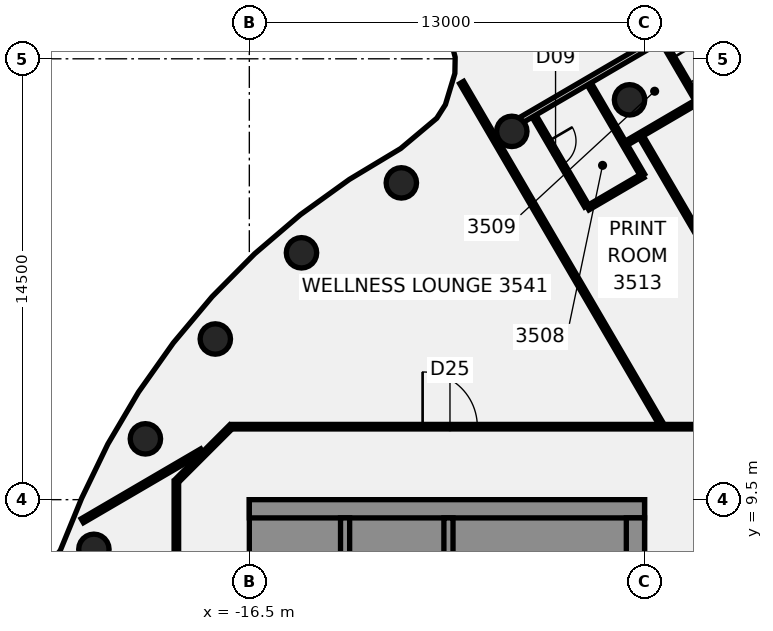
"""IFC4 building model, lengths in metres.
Left out: names, types, materials, properties, quantities, classifications, styles, units other than length and angle.
Written with IfcOpenShell. Run it as: python <this file> out.ifc"""

import sys

from ifc_helpers import new_model, si_unit, direction, frame, frame_2d, origin, origin_2d, place, context, subcontext, project, spatial, polyline, rectangle, circle, outline, extrude, element, fill, save


model = new_model("IFC4")
c1 = context("Model", 3, precision=1e-05, world=origin(), true_north=direction((0.0, 1.0)))
c2 = subcontext(c1, "Body", "Model", "MODEL_VIEW")
j1 = project(units=[si_unit("LENGTHUNIT", "METRE"), si_unit("PLANEANGLEUNIT", "RADIAN")], contexts=[c1])
p1 = place(None, origin())
s1 = spatial("IfcSite", under=j1, at=p1, CompositionType="ELEMENT")
p2 = place(p1, origin())
s2 = spatial("IfcBuilding", under=s1, at=p2, CompositionType="ELEMENT")
p3 = place(p2, frame((0.0, 0.0, 144.25)))
s3 = spatial("IfcBuildingStorey", under=s2, at=p3, CompositionType="ELEMENT", Elevation=144.25)
for number, where, z_axis, x_axis in (
    (1, (-3.994, 22.651, -0.14), (0.0, 0.0, 1.0), (1.0, 0.0, 0.0)),
    (2, (-7.866, 21.613, -0.14), (0.0, 0.0, 1.0), (1.0, 0.0, 0.0)),
    (3, (-11.5, 19.919, -0.14), (0.0, 0.0, 1.0), (1.0, 0.0, 0.0)),
    (4, (-14.784, 17.619, -0.14), (0.0, 0.0, 1.0), (1.0, 0.0, 0.0)),
    (5, (-17.619, 14.784, -0.14), (0.0, 0.0, 1.0), (1.0, 0.0, 0.0)),
    (6, (-19.919, 11.5, -0.14), (0.0, 0.0, 1.0), (1.0, 0.0, 0.0)),
    (7, (-21.613, 7.866, -0.14), (0.0, 0.0, 1.0), (1.0, 0.0, 0.0)),
):
    element("IfcColumn", number, at=place(p3, frame(where, z_axis=z_axis, x_axis=x_axis)), inside=s3, PredefinedType="COLUMN", context=c2, shape_type="SweptSolid", body=[
        extrude(circle(Radius=0.5, at=origin_2d()), origin(), (0.0, 0.0, 1.0), 3.75),
    ])
p4 = place(p3, frame((-11.997, 40.152, 0.0), z_axis=(0.0, 0.0, 1.0), x_axis=(0.504565342265, -0.863373508619, 0.0)))
e8 = element("IfcWall", 8, at=p4, inside=s3, PredefinedType="PARTITIONING", context=c2, shape_type="SweptSolid", body=[
    extrude(rectangle(XDim=20.306, YDim=0.15, at=frame_2d((10.153, 0.0))), origin(), (0.0, 0.0, 1.0), 3.01),
])
p5 = place(p4, frame((18.675, 0.0, 0.0)))
e9 = element("IfcOpeningElement", 9, at=p5, cuts=e8, PredefinedType="OPENING", context=c2, shape_type="SweptSolid", body=[
    extrude(rectangle(XDim=1.0, YDim=2.1, at=frame_2d((0.5, 1.05))), frame((0.0, 0.085, 0.0), z_axis=(0.0, -1.0, 0.0), x_axis=(1.0, 0.0, 0.0)), (0.0, 0.0, 1.0), 0.17),
])
p6 = place(p4, frame((8.776, 0.0, 0.0)))
e10 = element("IfcOpeningElement", 10, at=p6, cuts=e8, PredefinedType="OPENING", context=c2, shape_type="SweptSolid", body=[
    extrude(rectangle(XDim=0.9, YDim=2.1, at=frame_2d((0.45, 1.05))), frame((0.0, 0.085, 0.0), z_axis=(0.0, -1.0, 0.0), x_axis=(1.0, 0.0, 0.0)), (0.0, 0.0, 1.0), 0.17),
])
p7 = place(p4, frame((2.325, 0.0, 0.0)))
e11 = element("IfcOpeningElement", 11, at=p7, cuts=e8, PredefinedType="OPENING", context=c2, shape_type="SweptSolid", body=[
    extrude(rectangle(XDim=0.9, YDim=2.1, at=frame_2d((0.45, 1.05))), frame((0.0, 0.085, 0.0), z_axis=(0.0, -1.0, 0.0), x_axis=(1.0, 0.0, 0.0)), (0.0, 0.0, 1.0), 0.17),
])
p8 = place(p3, frame((-9.516, 23.22, 0.0), z_axis=(0.0, 0.0, 1.0), x_axis=(0.504508390898, -0.863406789128, 0.0)))
e12 = element("IfcWall", 12, at=p8, inside=s3, PredefinedType="PARTITIONING", context=c2, shape_type="SweptSolid", body=[
    extrude(rectangle(XDim=13.001, YDim=0.15, at=frame_2d((6.5, 0.0))), origin(), (0.0, 0.0, 1.0), 3.01),
])
p9 = place(p3, frame((-7.134, 22.117, 0.0), z_axis=(0.0, 0.0, 1.0), x_axis=(0.504522469431, -0.863398562565, 0.0)))
e13 = element("IfcWall", 13, at=p9, inside=s3, PredefinedType="PARTITIONING", context=c2, shape_type="SweptSolid", body=[
    extrude(rectangle(XDim=3.425, YDim=0.15, at=frame_2d((1.712, 0.0))), origin(), (0.0, 0.0, 1.0), 3.01),
])
p10 = place(p9, frame((0.95, 0.0, 0.0)))
e14 = element("IfcOpeningElement", 14, at=p10, cuts=e13, PredefinedType="OPENING", context=c2, shape_type="SweptSolid", body=[
    extrude(rectangle(XDim=0.9, YDim=2.1, at=frame_2d((0.45, 1.05))), frame((0.0, 0.085, 0.0), z_axis=(0.0, -1.0, 0.0), x_axis=(1.0, 0.0, 0.0)), (0.0, 0.0, 1.0), 0.17),
])
p11 = place(p3, frame((-5.318, 23.172, 0.0), z_axis=(0.0, 0.0, 1.0), x_axis=(0.504499996909, -0.863411693874, 0.0)))
e15 = element("IfcWall", 15, at=p11, inside=s3, PredefinedType="PARTITIONING", context=c2, shape_type="SweptSolid", body=[
    extrude(rectangle(XDim=3.475, YDim=0.15, at=frame_2d((1.737, 0.0))), origin(), (0.0, 0.0, 1.0), 3.01),
])
p12 = place(p3, frame((-3.604, 21.429, 0.0), z_axis=(0.0, 0.0, 1.0), x_axis=(0.504518269276, -0.86340101689, 0.0)))
e16 = element("IfcWall", 16, at=p12, inside=s3, PredefinedType="PARTITIONING", context=c2, shape_type="SweptSolid", body=[
    extrude(rectangle(XDim=10.927, YDim=0.15, at=frame_2d((5.463, 0.0))), origin(), (0.0, 0.0, 1.0), 3.01),
])
p13 = place(p12, frame((6.525, 0.0, 0.0)))
e17 = element("IfcOpeningElement", 17, at=p13, cuts=e16, PredefinedType="OPENING", context=c2, shape_type="SweptSolid", body=[
    extrude(rectangle(XDim=0.9, YDim=2.1, at=frame_2d((0.45, 1.05))), frame((0.0, 0.085, 0.0), z_axis=(0.0, -1.0, 0.0), x_axis=(1.0, 0.0, 0.0)), (0.0, 0.0, 1.0), 0.17),
])
p14 = place(p3, frame((-17.065, 11.9, 0.0), z_axis=(0.0, 0.0, 1.0), x_axis=(1.0, 0.0, 0.0)))
e18 = element("IfcWall", 18, at=p14, inside=s3, PredefinedType="PARTITIONING", context=c2, shape_type="SweptSolid", body=[
    extrude(rectangle(XDim=34.165, YDim=0.15, at=frame_2d((17.083, 0.0))), origin(), (0.0, 0.0, 1.0), 3.01),
])
p15 = place(p14, frame((22.029, 0.0, 0.0)))
e19 = element("IfcOpeningElement", 19, at=p15, cuts=e18, PredefinedType="OPENING", context=c2, shape_type="SweptSolid", body=[
    extrude(rectangle(XDim=1.8, YDim=2.1, at=frame_2d((0.9, 1.05))), frame((0.0, 0.085, 0.0), z_axis=(0.0, -1.0, 0.0), x_axis=(1.0, 0.0, 0.0)), (0.0, 0.0, 1.0), 0.17),
])
p16 = place(p14, frame((29.48, 0.0, 0.0)))
e20 = element("IfcOpeningElement", 20, at=p16, cuts=e18, PredefinedType="OPENING", context=c2, shape_type="SweptSolid", body=[
    extrude(rectangle(XDim=1.8, YDim=2.1, at=frame_2d((0.9, 1.05))), frame((0.0, 0.085, 0.0), z_axis=(0.0, -1.0, 0.0), x_axis=(1.0, 0.0, 0.0)), (0.0, 0.0, 1.0), 0.17),
])
p17 = place(p14, frame((6.265, 0.0, 0.0)))
e21 = element("IfcOpeningElement", 21, at=p17, cuts=e18, PredefinedType="OPENING", context=c2, shape_type="SweptSolid", body=[
    extrude(rectangle(XDim=1.8, YDim=2.1, at=frame_2d((0.9, 1.05))), frame((0.0, 0.085, 0.0), z_axis=(0.0, -1.0, 0.0), x_axis=(1.0, 0.0, 0.0)), (0.0, 0.0, 1.0), 0.17),
])
p18 = place(p3, frame((-21.993, 8.807, 0.0), z_axis=(0.0, 0.0, 1.0), x_axis=(0.863415016257, 0.504494310871, 0.0)))
e22 = element("IfcWall", 22, at=p18, inside=s3, PredefinedType="PARTITIONING", context=c2, shape_type="SweptSolid", body=[
    extrude(rectangle(XDim=4.553, YDim=0.15, at=frame_2d((2.277, 0.0))), origin(), (0.0, 0.0, 1.0), 3.01),
])
p19 = place(p3, frame((-7.763, 21.865, 0.0), z_axis=(0.0, 0.0, 1.0), x_axis=(0.863607279879, 0.504165117933, 0.0)))
e23 = element("IfcWall", 23, at=p19, inside=s3, PredefinedType="PARTITIONING", context=c2, shape_type="SweptSolid", body=[
    extrude(rectangle(XDim=13.47, YDim=0.2, at=frame_2d((6.735, 0.0))), origin(), (0.0, 0.0, 1.0), 3.01),
])
p20 = place(p19, frame((5.872, 0.0, 0.0)))
e24 = element("IfcOpeningElement", 24, at=p20, cuts=e23, PredefinedType="OPENING", context=c2, shape_type="SweptSolid", body=[
    extrude(rectangle(XDim=1.4, YDim=2.1, at=frame_2d((0.7, 1.05))), frame((0.0, 0.11, 0.0), z_axis=(0.0, -1.0, 0.0), x_axis=(1.0, 0.0, 0.0)), (0.0, 0.0, 1.0), 0.22),
])
p21 = place(p3, frame((-5.368, 19.095, 0.0), z_axis=(0.0, 0.0, 1.0), x_axis=(0.863264064629, 0.504752567819, 0.0)))
e25 = element("IfcWall", 25, at=p21, inside=s3, PredefinedType="PARTITIONING", context=c2, shape_type="SweptSolid", body=[
    extrude(rectangle(XDim=2.1, YDim=0.15, at=frame_2d((1.05, 0.0))), origin(), (0.0, 0.0, 1.0), 3.01),
])
p22 = place(p3, frame((-4.095, 21.229, 0.0), z_axis=(0.0, 0.0, 1.0), x_axis=(0.863209703011, 0.504845529472, 0.0)))
e26 = element("IfcWall", 26, at=p22, inside=s3, PredefinedType="PARTITIONING", context=c2, shape_type="SweptSolid", body=[
    extrude(rectangle(XDim=2.725, YDim=0.15, at=frame_2d((1.363, 0.0))), origin(), (0.0, 0.0, 1.0), 3.01),
])
p23 = place(p3, frame((-18.872, 10.128, 0.0), z_axis=(0.0, 0.0, 1.0), x_axis=(0.707106781187, 0.707106781187, 0.0)))
e27 = element("IfcWall", 27, at=p23, inside=s3, PredefinedType="PARTITIONING", context=c2, shape_type="SweptSolid", body=[
    extrude(rectangle(XDim=2.505, YDim=0.15, at=frame_2d((1.253, 0.0))), origin(), (0.0, 0.0, 1.0), 3.01),
])
p24 = place(p3, frame((-18.9, -10.1, 0.0), z_axis=(0.0, 0.0, 1.0), x_axis=(0.0, 1.0, 0.0)))
e28 = element("IfcWall", 28, at=p24, inside=s3, PredefinedType="PARTITIONING", context=c2, shape_type="SweptSolid", body=[
    extrude(rectangle(XDim=20.2, YDim=0.15, at=frame_2d((10.1, 0.0))), origin(), (0.0, 0.0, 1.0), 3.01),
])
p25 = place(p24, frame((11.874, 0.0, 0.0)))
e29 = element("IfcOpeningElement", 29, at=p25, cuts=e28, PredefinedType="OPENING", context=c2, shape_type="SweptSolid", body=[
    extrude(rectangle(XDim=1.8, YDim=2.1, at=frame_2d((0.9, 1.05))), frame((0.0, 0.085, 0.0), z_axis=(0.0, -1.0, 0.0), x_axis=(1.0, 0.0, 0.0)), (0.0, 0.0, 1.0), 0.17),
])
p26 = place(p24, frame((4.159, 0.0, 0.0)))
e30 = element("IfcOpeningElement", 30, at=p26, cuts=e28, PredefinedType="OPENING", context=c2, shape_type="SweptSolid", body=[
    extrude(rectangle(XDim=1.8, YDim=2.1, at=frame_2d((0.9, 1.05))), frame((0.0, 0.085, 0.0), z_axis=(0.0, -1.0, 0.0), x_axis=(1.0, 0.0, 0.0)), (0.0, 0.0, 1.0), 0.17),
])
p27 = place(p3, origin())
e31 = element("IfcWall", 31, at=p27, inside=s3, PredefinedType="SHEAR", context=c2, shape_type="SweptSolid", body=[
    extrude(outline(polyline([(-13.5, -8.125), (-15.9, -8.125), (-15.9, -5.625), (-13.5, -5.625), (-13.5, -5.375), (-15.9, -5.375), (-15.9, 5.375), (-13.5, 5.375), (-13.5, 5.625), (-15.9, 5.625), (-15.9, 8.125), (-13.5, 8.125), (-13.5, 8.9), (-15.9, 8.9), (-16.5, 8.9), (-16.5, -8.9), (-15.9, -8.9), (-13.5, -8.9), (-13.5, -8.125)])), origin(), (0.0, 0.0, 1.0), 3.61),
])
p28 = place(p3, frame((-16.5, 9.2, 0.0), z_axis=(0.0, 0.0, 1.0), x_axis=(1.0, 0.0, 0.0)))
e32 = element("IfcWall", 32, at=p28, inside=s3, PredefinedType="SHEAR", context=c2, shape_type="SweptSolid", body=[
    extrude(rectangle(XDim=13.0, YDim=0.6, at=frame_2d((6.5, 0.0))), origin(), (0.0, 0.0, 1.0), 3.61),
])
p29 = place(p3, origin())
e33 = element("IfcWall", 33, at=p29, inside=s3, PredefinedType="SHEAR", context=c2, shape_type="SweptSolid", body=[
    extrude(outline(polyline([(-9.8, -5.375), (-9.8, -5.625), (-7.5, -5.625), (-7.2, -5.625), (-7.2, 8.9), (-7.5, 8.9), (-9.8, 8.9), (-9.8, 8.125), (-7.5, 8.125), (-7.5, 5.625), (-9.8, 5.625), (-9.8, 5.375), (-7.5, 5.375), (-7.5, 2.875), (-9.8, 2.875), (-9.8, 2.625), (-7.5, 2.625), (-7.5, 0.125), (-9.8, 0.125), (-9.8, -0.125), (-7.5, -0.125), (-7.5, -2.625), (-9.8, -2.625), (-9.8, -2.875), (-7.5, -2.875), (-7.5, -5.375), (-9.8, -5.375)])), origin(), (0.0, 0.0, 1.0), 3.61),
])
p30 = place(p3, frame((-13.35, -8.9, 0.0), z_axis=(0.0, 0.0, 1.0), x_axis=(0.0, 1.0, 0.0)))
e34 = element("IfcWall", 34, at=p30, inside=s3, PredefinedType="SHEAR", context=c2, shape_type="SweptSolid", body=[
    extrude(rectangle(XDim=17.8, YDim=0.3, at=frame_2d((8.9, 0.0))), origin(), (0.0, 0.0, 1.0), 3.61),
])
p31 = place(p30, frame((1.325, 0.0, 0.0)))
e35 = element("IfcOpeningElement", 35, at=p31, cuts=e34, PredefinedType="OPENING", context=c2, shape_type="SweptSolid", body=[
    extrude(rectangle(XDim=1.4, YDim=2.1, at=frame_2d((0.7, 1.05))), frame((0.0, 0.16, 0.0), z_axis=(0.0, -1.0, 0.0), x_axis=(1.0, 0.0, 0.0)), (0.0, 0.0, 1.0), 0.32),
])
p32 = place(p30, frame((4.754, 0.0, 0.0)))
e36 = element("IfcOpeningElement", 36, at=p32, cuts=e34, PredefinedType="OPENING", context=c2, shape_type="SweptSolid", body=[
    extrude(rectangle(XDim=1.0, YDim=2.1, at=frame_2d((0.5, 1.05))), frame((0.0, 0.16, 0.0), z_axis=(0.0, -1.0, 0.0), x_axis=(1.0, 0.0, 0.0)), (0.0, 0.0, 1.0), 0.32),
])
p33 = place(p30, frame((10.254, 0.0, 0.0)))
e37 = element("IfcOpeningElement", 37, at=p33, cuts=e34, PredefinedType="OPENING", context=c2, shape_type="SweptSolid", body=[
    extrude(rectangle(XDim=1.0, YDim=2.1, at=frame_2d((0.5, 1.05))), frame((0.0, 0.16, 0.0), z_axis=(0.0, -1.0, 0.0), x_axis=(1.0, 0.0, 0.0)), (0.0, 0.0, 1.0), 0.32),
])
p34 = place(p3, frame((-9.95, -8.9, 0.0), z_axis=(0.0, 0.0, 1.0), x_axis=(0.0, 1.0, 0.0)))
e38 = element("IfcWall", 38, at=p34, inside=s3, PredefinedType="SHEAR", context=c2, shape_type="SweptSolid", body=[
    extrude(rectangle(XDim=17.8, YDim=0.3, at=frame_2d((8.9, 0.0))), origin(), (0.0, 0.0, 1.0), 3.61),
])
p35 = place(p34, frame((4.175, 0.0, 0.0)))
e39 = element("IfcOpeningElement", 39, at=p35, cuts=e38, PredefinedType="OPENING", context=c2, shape_type="SweptSolid", body=[
    extrude(rectangle(XDim=1.2, YDim=2.1, at=frame_2d((0.6, 1.05))), frame((0.0, 0.16, 0.0), z_axis=(0.0, -1.0, 0.0), x_axis=(1.0, 0.0, 0.0)), (0.0, 0.0, 1.0), 0.32),
])
p36 = place(p34, frame((6.925, 0.0, 0.0)))
e40 = element("IfcOpeningElement", 40, at=p36, cuts=e38, PredefinedType="OPENING", context=c2, shape_type="SweptSolid", body=[
    extrude(rectangle(XDim=1.2, YDim=2.1, at=frame_2d((0.6, 1.05))), frame((0.0, 0.16, 0.0), z_axis=(0.0, -1.0, 0.0), x_axis=(1.0, 0.0, 0.0)), (0.0, 0.0, 1.0), 0.32),
])
p37 = place(p3, frame((-3.8, -8.9, 0.0), z_axis=(0.0, 0.0, 1.0), x_axis=(0.0, 1.0, 0.0)))
e41 = element("IfcWall", 41, at=p37, inside=s3, PredefinedType="SHEAR", context=c2, shape_type="SweptSolid", body=[
    extrude(rectangle(XDim=17.8, YDim=0.6, at=frame_2d((8.9, 0.0))), origin(), (0.0, 0.0, 1.0), 3.61),
])
p38 = place(p37, frame((1.25, 0.0, 0.0)))
e42 = element("IfcOpeningElement", 42, at=p38, cuts=e41, PredefinedType="OPENING", context=c2, shape_type="SweptSolid", body=[
    extrude(rectangle(XDim=1.8, YDim=2.1, at=frame_2d((0.9, 1.05))), frame((0.0, 0.31, 0.0), z_axis=(0.0, -1.0, 0.0), x_axis=(1.0, 0.0, 0.0)), (0.0, 0.0, 1.0), 0.62),
])
p39 = place(p37, frame((11.698, 0.0, 0.0)))
e43 = element("IfcOpeningElement", 43, at=p39, cuts=e41, PredefinedType="OPENING", context=c2, shape_type="SweptSolid", body=[
    extrude(rectangle(XDim=1.0, YDim=2.1, at=frame_2d((0.5, 1.05))), frame((0.0, 0.31, 0.0), z_axis=(0.0, -1.0, 0.0), x_axis=(1.0, 0.0, 0.0)), (0.0, 0.0, 1.0), 0.62),
])
p40 = place(p37, frame((15.222, 0.0, 0.0)))
e44 = element("IfcOpeningElement", 44, at=p40, cuts=e41, PredefinedType="OPENING", context=c2, shape_type="SweptSolid", body=[
    extrude(rectangle(XDim=1.0, YDim=2.1, at=frame_2d((0.5, 1.05))), frame((0.0, 0.31, 0.0), z_axis=(0.0, -1.0, 0.0), x_axis=(1.0, 0.0, 0.0)), (0.0, 0.0, 1.0), 0.62),
])
p41 = place(p5, frame((1.0, 0.0, 0.0), z_axis=(0.0, 0.0, 1.0), x_axis=(-1.0, 0.0, 0.0)))
e45 = element("IfcDoor", 45, at=p41, inside=s3, OperationType="SINGLE_SWING_RIGHT", PredefinedType="DOOR", context=c2, shape_type="SweptSolid", body=[
    extrude(rectangle(XDim=1.0, YDim=2.1, at=frame_2d((0.5, 1.05))), frame((0.0, 0.025, 0.0), z_axis=(0.0, -1.0, 0.0), x_axis=(1.0, 0.0, 0.0)), (0.0, 0.0, 1.0), 0.05),
])
fill(e9, e45)
p42 = place(p10, origin())
e46 = element("IfcDoor", 46, at=p42, inside=s3, OperationType="SINGLE_SWING_RIGHT", PredefinedType="DOOR", context=c2, shape_type="SweptSolid", body=[
    extrude(rectangle(XDim=0.9, YDim=2.1, at=frame_2d((0.45, 1.05))), frame((0.0, 0.025, 0.0), z_axis=(0.0, -1.0, 0.0), x_axis=(1.0, 0.0, 0.0)), (0.0, 0.0, 1.0), 0.05),
])
fill(e14, e46)
p43 = place(p17, origin())
e47 = element("IfcDoor", 47, at=p43, inside=s3, OperationType="DOUBLE_DOOR_SINGLE_SWING", PredefinedType="DOOR", context=c2, shape_type="SweptSolid", body=[
    extrude(rectangle(XDim=1.8, YDim=2.1, at=frame_2d((0.9, 1.05))), frame((0.0, 0.025, 0.0), z_axis=(0.0, -1.0, 0.0), x_axis=(1.0, 0.0, 0.0)), (0.0, 0.0, 1.0), 0.05),
])
fill(e21, e47)
save(model, sys.argv[1])
